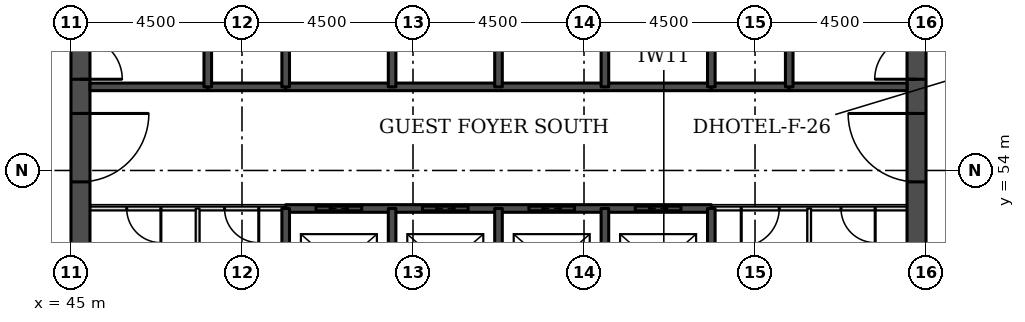
"""IFC4 building model, lengths in metres.
Left out: names, types, materials, properties, quantities, classifications, styles, units other than length and angle.
Written with IfcOpenShell. Run it as: python <this file> out.ifc"""

import sys

from ifc_helpers import new_model, si_unit, direction, frame, frame_2d, origin, place, context, subcontext, project, spatial, rectangle, extrude, element, fill, save


model = new_model("IFC4")
c1 = context("Model", 3, precision=1e-05, world=origin(), true_north=direction((0.0, 1.0)))
c2 = subcontext(c1, "Body", "Model", "MODEL_VIEW")
j1 = project(units=[si_unit("LENGTHUNIT", "METRE"), si_unit("PLANEANGLEUNIT", "RADIAN")], contexts=[c1])
p1 = place(None, origin())
s1 = spatial("IfcSite", under=j1, at=p1, CompositionType="ELEMENT")
p2 = place(p1, origin())
s2 = spatial("IfcBuilding", under=s1, at=p2, CompositionType="ELEMENT")
p3 = place(p2, frame((0.0, 0.0, 42.9)))
s3 = spatial("IfcBuildingStorey", under=s2, at=p3, CompositionType="ELEMENT", Elevation=42.9)
p4 = place(p3, frame((45.25, 49.5, 0.0), z_axis=(0.0, 0.0, 1.0), x_axis=(0.0, 1.0, 0.0)))
e1 = element("IfcWall", 1, at=p4, inside=s3, PredefinedType="SHEAR", context=c2, shape_type="SweptSolid", body=[
    extrude(rectangle(XDim=22.5, YDim=0.5, at=frame_2d((11.25, 0.0))), origin(), (0.0, 0.0, 1.0), 3.3),
])
p5 = place(p4, frame((4.2, 0.0, 0.0)))
e2 = element("IfcOpeningElement", 2, at=p5, cuts=e1, PredefinedType="OPENING", context=c2, shape_type="SweptSolid", body=[
    extrude(rectangle(XDim=1.8, YDim=2.1, at=frame_2d((0.9, 1.05))), frame((0.0, 0.26, 0.0), z_axis=(0.0, -1.0, 0.0), x_axis=(1.0, 0.0, 0.0)), (0.0, 0.0, 1.0), 0.52),
])
p6 = place(p4, frame((6.9, 0.0, 0.0)))
e3 = element("IfcOpeningElement", 3, at=p6, cuts=e1, PredefinedType="OPENING", context=c2, shape_type="SweptSolid", body=[
    extrude(rectangle(XDim=1.1, YDim=2.1, at=frame_2d((0.55, 1.05))), frame((0.0, 0.26, 0.0), z_axis=(0.0, -1.0, 0.0), x_axis=(1.0, 0.0, 0.0)), (0.0, 0.0, 1.0), 0.52),
])
p7 = place(p4, frame((13.6, 0.0, 0.0)))
e4 = element("IfcOpeningElement", 4, at=p7, cuts=e1, PredefinedType="OPENING", context=c2, shape_type="SweptSolid", body=[
    extrude(rectangle(XDim=1.1, YDim=2.1, at=frame_2d((0.55, 1.05))), frame((0.0, 0.26, 0.0), z_axis=(0.0, -1.0, 0.0), x_axis=(1.0, 0.0, 0.0)), (0.0, 0.0, 1.0), 0.52),
])
p8 = place(p4, frame((16.5, 0.0, 0.0)))
e5 = element("IfcOpeningElement", 5, at=p8, cuts=e1, PredefinedType="OPENING", context=c2, shape_type="SweptSolid", body=[
    extrude(rectangle(XDim=1.8, YDim=2.1, at=frame_2d((0.9, 1.05))), frame((0.0, 0.26, 0.0), z_axis=(0.0, -1.0, 0.0), x_axis=(1.0, 0.0, 0.0)), (0.0, 0.0, 1.0), 0.52),
])
p9 = place(p3, frame((67.25, 49.5, 0.0), z_axis=(0.0, 0.0, 1.0), x_axis=(0.0, 1.0, 0.0)))
e6 = element("IfcWall", 6, at=p9, inside=s3, PredefinedType="SHEAR", context=c2, shape_type="SweptSolid", body=[
    extrude(rectangle(XDim=22.5, YDim=0.5, at=frame_2d((11.25, 0.0))), origin(), (0.0, 0.0, 1.0), 3.3),
])
p10 = place(p9, frame((4.2, 0.0, 0.0)))
e7 = element("IfcOpeningElement", 7, at=p10, cuts=e6, PredefinedType="OPENING", context=c2, shape_type="SweptSolid", body=[
    extrude(rectangle(XDim=1.8, YDim=2.1, at=frame_2d((0.9, 1.05))), frame((0.0, 0.26, 0.0), z_axis=(0.0, -1.0, 0.0), x_axis=(1.0, 0.0, 0.0)), (0.0, 0.0, 1.0), 0.52),
])
p11 = place(p9, frame((6.9, 0.0, 0.0)))
e8 = element("IfcOpeningElement", 8, at=p11, cuts=e6, PredefinedType="OPENING", context=c2, shape_type="SweptSolid", body=[
    extrude(rectangle(XDim=1.1, YDim=2.1, at=frame_2d((0.55, 1.05))), frame((0.0, 0.26, 0.0), z_axis=(0.0, -1.0, 0.0), x_axis=(1.0, 0.0, 0.0)), (0.0, 0.0, 1.0), 0.52),
])
p12 = place(p9, frame((13.6, 0.0, 0.0)))
e9 = element("IfcOpeningElement", 9, at=p12, cuts=e6, PredefinedType="OPENING", context=c2, shape_type="SweptSolid", body=[
    extrude(rectangle(XDim=1.1, YDim=2.1, at=frame_2d((0.55, 1.05))), frame((0.0, 0.26, 0.0), z_axis=(0.0, -1.0, 0.0), x_axis=(1.0, 0.0, 0.0)), (0.0, 0.0, 1.0), 0.52),
])
p13 = place(p9, frame((16.5, 0.0, 0.0)))
e10 = element("IfcOpeningElement", 10, at=p13, cuts=e6, PredefinedType="OPENING", context=c2, shape_type="SweptSolid", body=[
    extrude(rectangle(XDim=1.8, YDim=2.1, at=frame_2d((0.9, 1.05))), frame((0.0, 0.26, 0.0), z_axis=(0.0, -1.0, 0.0), x_axis=(1.0, 0.0, 0.0)), (0.0, 0.0, 1.0), 0.52),
])
p14 = place(p3, frame((45.5, 53.0, 0.0), z_axis=(0.0, 0.0, 1.0), x_axis=(1.0, 0.0, 0.0)))
e11 = element("IfcWall", 11, at=p14, inside=s3, PredefinedType="PARTITIONING", context=c2, shape_type="SweptSolid", body=[
    extrude(rectangle(XDim=5.15, YDim=0.1, at=frame_2d((2.575, 0.0))), origin(), (0.0, 0.0, 1.0), 3.08),
])
p15 = place(p14, frame((0.966, 0.0, 0.0)))
e12 = element("IfcOpeningElement", 12, at=p15, cuts=e11, PredefinedType="OPENING", context=c2, shape_type="SweptSolid", body=[
    extrude(rectangle(XDim=0.9, YDim=2.1, at=frame_2d((0.45, 1.05))), frame((0.0, 0.06, 0.0), z_axis=(0.0, -1.0, 0.0), x_axis=(1.0, 0.0, 0.0)), (0.0, 0.0, 1.0), 0.12),
])
p16 = place(p14, frame((3.541, 0.0, 0.0)))
e13 = element("IfcOpeningElement", 13, at=p16, cuts=e11, PredefinedType="OPENING", context=c2, shape_type="SweptSolid", body=[
    extrude(rectangle(XDim=0.9, YDim=2.1, at=frame_2d((0.45, 1.05))), frame((0.0, 0.06, 0.0), z_axis=(0.0, -1.0, 0.0), x_axis=(1.0, 0.0, 0.0)), (0.0, 0.0, 1.0), 0.12),
])
p17 = place(p3, frame((61.85, 53.0, 0.0), z_axis=(0.0, 0.0, 1.0), x_axis=(1.0, 0.0, 0.0)))
e14 = element("IfcWall", 14, at=p17, inside=s3, PredefinedType="PARTITIONING", context=c2, shape_type="SweptSolid", body=[
    extrude(rectangle(XDim=5.15, YDim=0.1, at=frame_2d((2.575, 0.0))), origin(), (0.0, 0.0, 1.0), 3.08),
])
p18 = place(p17, frame((3.413, 0.0, 0.0)))
e15 = element("IfcOpeningElement", 15, at=p18, cuts=e14, PredefinedType="OPENING", context=c2, shape_type="SweptSolid", body=[
    extrude(rectangle(XDim=0.9, YDim=2.1, at=frame_2d((0.45, 1.05))), frame((0.0, 0.06, 0.0), z_axis=(0.0, -1.0, 0.0), x_axis=(1.0, 0.0, 0.0)), (0.0, 0.0, 1.0), 0.12),
])
p19 = place(p17, frame((0.788, 0.0, 0.0)))
e16 = element("IfcOpeningElement", 16, at=p19, cuts=e14, PredefinedType="OPENING", context=c2, shape_type="SweptSolid", body=[
    extrude(rectangle(XDim=1.0, YDim=2.1, at=frame_2d((0.5, 1.05))), frame((0.0, 0.06, 0.0), z_axis=(0.0, -1.0, 0.0), x_axis=(1.0, 0.0, 0.0)), (0.0, 0.0, 1.0), 0.12),
])
p20 = place(p3, frame((50.65, 53.0, 0.0), z_axis=(0.0, 0.0, 1.0), x_axis=(1.0, 0.0, 0.0)))
e17 = element("IfcWall", 17, at=p20, inside=s3, PredefinedType="SOLIDWALL", context=c2, shape_type="SweptSolid", body=[
    extrude(rectangle(XDim=11.2, YDim=0.2, at=frame_2d((5.6, 0.0))), origin(), (0.0, 0.0, 1.0), 3.08),
])
p21 = place(p20, frame((0.8, 0.0, 0.0)))
e18 = element("IfcOpeningElement", 18, at=p21, cuts=e17, PredefinedType="OPENING", context=c2, shape_type="SweptSolid", body=[
    extrude(rectangle(XDim=1.2, YDim=2.1, at=frame_2d((0.6, 1.05))), frame((0.0, 0.11, 0.0), z_axis=(0.0, -1.0, 0.0), x_axis=(1.0, 0.0, 0.0)), (0.0, 0.0, 1.0), 0.22),
])
p22 = place(p20, frame((3.6, 0.0, 0.0)))
e19 = element("IfcOpeningElement", 19, at=p22, cuts=e17, PredefinedType="OPENING", context=c2, shape_type="SweptSolid", body=[
    extrude(rectangle(XDim=1.2, YDim=2.1, at=frame_2d((0.6, 1.05))), frame((0.0, 0.11, 0.0), z_axis=(0.0, -1.0, 0.0), x_axis=(1.0, 0.0, 0.0)), (0.0, 0.0, 1.0), 0.22),
])
p23 = place(p20, frame((6.4, 0.0, 0.0)))
e20 = element("IfcOpeningElement", 20, at=p23, cuts=e17, PredefinedType="OPENING", context=c2, shape_type="SweptSolid", body=[
    extrude(rectangle(XDim=1.2, YDim=2.1, at=frame_2d((0.6, 1.05))), frame((0.0, 0.11, 0.0), z_axis=(0.0, -1.0, 0.0), x_axis=(1.0, 0.0, 0.0)), (0.0, 0.0, 1.0), 0.22),
])
p24 = place(p20, frame((9.2, 0.0, 0.0)))
e21 = element("IfcOpeningElement", 21, at=p24, cuts=e17, PredefinedType="OPENING", context=c2, shape_type="SweptSolid", body=[
    extrude(rectangle(XDim=1.2, YDim=2.1, at=frame_2d((0.6, 1.05))), frame((0.0, 0.11, 0.0), z_axis=(0.0, -1.0, 0.0), x_axis=(1.0, 0.0, 0.0)), (0.0, 0.0, 1.0), 0.22),
])
for number, where, z_axis, x_axis in (
    (22, (48.6, 56.2, 0.0), (0.0, 0.0, 1.0), (1.0, 0.0, 0.0)),
    (23, (61.85, 56.2, 0.0), (0.0, 0.0, 1.0), (1.0, 0.0, 0.0)),
):
    element("IfcWall", number, at=place(p3, frame(where, z_axis=z_axis, x_axis=x_axis)), inside=s3, PredefinedType="SOLIDWALL", context=c2, shape_type="SweptSolid", body=[
        extrude(rectangle(XDim=2.05, YDim=0.2, at=frame_2d((1.025, 0.0))), origin(), (0.0, 0.0, 1.0), 3.08),
    ])
p25 = place(p3, frame((45.5, 56.2, 0.0), z_axis=(0.0, 0.0, 1.0), x_axis=(1.0, 0.0, 0.0)))
e24 = element("IfcWall", 24, at=p25, inside=s3, PredefinedType="SOLIDWALL", context=c2, shape_type="SweptSolid", body=[
    extrude(rectangle(XDim=3.1, YDim=0.2, at=frame_2d((1.55, 0.0))), origin(), (0.0, 0.0, 1.0), 3.08),
])
p26 = place(p3, frame((50.65, 56.2, 0.0), z_axis=(0.0, 0.0, 1.0), x_axis=(1.0, 0.0, 0.0)))
e25 = element("IfcWall", 25, at=p26, inside=s3, PredefinedType="SOLIDWALL", context=c2, shape_type="SweptSolid", body=[
    extrude(rectangle(XDim=11.2, YDim=0.2, at=frame_2d((5.6, 0.0))), origin(), (0.0, 0.0, 1.0), 3.08),
])
p27 = place(p3, frame((63.9, 56.2, 0.0), z_axis=(0.0, 0.0, 1.0), x_axis=(1.0, 0.0, 0.0)))
e26 = element("IfcWall", 26, at=p27, inside=s3, PredefinedType="SOLIDWALL", context=c2, shape_type="SweptSolid", body=[
    extrude(rectangle(XDim=3.1, YDim=0.2, at=frame_2d((1.55, 0.0))), origin(), (0.0, 0.0, 1.0), 3.08),
])
p28 = place(p3, frame((48.333, 50.0, 0.0), z_axis=(0.0, 0.0, 1.0), x_axis=(0.0, 1.0, 0.0)))
e27 = element("IfcWall", 27, at=p28, inside=s3, PredefinedType="PARTITIONING", context=c2, shape_type="SweptSolid", body=[
    extrude(rectangle(XDim=3.0, YDim=0.1, at=frame_2d((1.5, 0.0))), origin(), (0.0, 0.0, 1.0), 3.08),
])
p29 = place(p3, frame((48.6, 56.2, 0.0), z_axis=(0.0, 0.0, 1.0), x_axis=(0.0, 1.0, 0.0)))
e28 = element("IfcWall", 28, at=p29, inside=s3, PredefinedType="SOLIDWALL", context=c2, shape_type="SweptSolid", body=[
    extrude(rectangle(XDim=5.8, YDim=0.2, at=frame_2d((2.9, 0.0))), origin(), (0.0, 0.0, 1.0), 3.08),
])
p30 = place(p3, frame((50.65, 50.0, 0.0), z_axis=(0.0, 0.0, 1.0), x_axis=(0.0, 1.0, 0.0)))
e29 = element("IfcWall", 29, at=p30, inside=s3, PredefinedType="SOLIDWALL", context=c2, shape_type="SweptSolid", body=[
    extrude(rectangle(XDim=3.0, YDim=0.2, at=frame_2d((1.5, 0.0))), origin(), (0.0, 0.0, 1.0), 3.08),
])
p31 = place(p3, frame((50.65, 56.2, 0.0), z_axis=(0.0, 0.0, 1.0), x_axis=(0.0, 1.0, 0.0)))
e30 = element("IfcWall", 30, at=p31, inside=s3, PredefinedType="SOLIDWALL", context=c2, shape_type="SweptSolid", body=[
    extrude(rectangle(XDim=2.8, YDim=0.2, at=frame_2d((1.4, 0.0))), origin(), (0.0, 0.0, 1.0), 3.08),
])
p32 = place(p3, frame((53.45, 50.0, 0.0), z_axis=(0.0, 0.0, 1.0), x_axis=(0.0, 1.0, 0.0)))
e31 = element("IfcWall", 31, at=p32, inside=s3, PredefinedType="SOLIDWALL", context=c2, shape_type="SweptSolid", body=[
    extrude(rectangle(XDim=3.0, YDim=0.2, at=frame_2d((1.5, 0.0))), origin(), (0.0, 0.0, 1.0), 3.08),
])
p33 = place(p3, frame((53.45, 56.2, 0.0), z_axis=(0.0, 0.0, 1.0), x_axis=(0.0, 1.0, 0.0)))
e32 = element("IfcWall", 32, at=p33, inside=s3, PredefinedType="SOLIDWALL", context=c2, shape_type="SweptSolid", body=[
    extrude(rectangle(XDim=2.8, YDim=0.2, at=frame_2d((1.4, 0.0))), origin(), (0.0, 0.0, 1.0), 3.08),
])
p34 = place(p3, frame((56.25, 50.0, 0.0), z_axis=(0.0, 0.0, 1.0), x_axis=(0.0, 1.0, 0.0)))
e33 = element("IfcWall", 33, at=p34, inside=s3, PredefinedType="SOLIDWALL", context=c2, shape_type="SweptSolid", body=[
    extrude(rectangle(XDim=3.0, YDim=0.2, at=frame_2d((1.5, 0.0))), origin(), (0.0, 0.0, 1.0), 3.08),
])
p35 = place(p3, frame((56.25, 56.2, 0.0), z_axis=(0.0, 0.0, 1.0), x_axis=(0.0, 1.0, 0.0)))
e34 = element("IfcWall", 34, at=p35, inside=s3, PredefinedType="SOLIDWALL", context=c2, shape_type="SweptSolid", body=[
    extrude(rectangle(XDim=2.8, YDim=0.2, at=frame_2d((1.4, 0.0))), origin(), (0.0, 0.0, 1.0), 3.08),
])
p36 = place(p3, frame((59.05, 50.0, 0.0), z_axis=(0.0, 0.0, 1.0), x_axis=(0.0, 1.0, 0.0)))
e35 = element("IfcWall", 35, at=p36, inside=s3, PredefinedType="SOLIDWALL", context=c2, shape_type="SweptSolid", body=[
    extrude(rectangle(XDim=3.0, YDim=0.2, at=frame_2d((1.5, 0.0))), origin(), (0.0, 0.0, 1.0), 3.08),
])
p37 = place(p3, frame((59.05, 56.2, 0.0), z_axis=(0.0, 0.0, 1.0), x_axis=(0.0, 1.0, 0.0)))
e36 = element("IfcWall", 36, at=p37, inside=s3, PredefinedType="SOLIDWALL", context=c2, shape_type="SweptSolid", body=[
    extrude(rectangle(XDim=2.8, YDim=0.2, at=frame_2d((1.4, 0.0))), origin(), (0.0, 0.0, 1.0), 3.08),
])
p38 = place(p3, frame((61.85, 50.0, 0.0), z_axis=(0.0, 0.0, 1.0), x_axis=(0.0, 1.0, 0.0)))
e37 = element("IfcWall", 37, at=p38, inside=s3, PredefinedType="SOLIDWALL", context=c2, shape_type="SweptSolid", body=[
    extrude(rectangle(XDim=3.0, YDim=0.2, at=frame_2d((1.5, 0.0))), origin(), (0.0, 0.0, 1.0), 3.08),
])
p39 = place(p3, frame((61.85, 56.2, 0.0), z_axis=(0.0, 0.0, 1.0), x_axis=(0.0, 1.0, 0.0)))
e38 = element("IfcWall", 38, at=p39, inside=s3, PredefinedType="SOLIDWALL", context=c2, shape_type="SweptSolid", body=[
    extrude(rectangle(XDim=2.8, YDim=0.2, at=frame_2d((1.4, 0.0))), origin(), (0.0, 0.0, 1.0), 3.08),
])
p40 = place(p3, frame((63.9, 56.2, 0.0), z_axis=(0.0, 0.0, 1.0), x_axis=(0.0, 1.0, 0.0)))
e39 = element("IfcWall", 39, at=p40, inside=s3, PredefinedType="SOLIDWALL", context=c2, shape_type="SweptSolid", body=[
    extrude(rectangle(XDim=5.8, YDim=0.2, at=frame_2d((2.9, 0.0))), origin(), (0.0, 0.0, 1.0), 3.08),
])
p41 = place(p3, frame((64.425, 50.0, 0.0), z_axis=(0.0, 0.0, 1.0), x_axis=(0.0, 1.0, 0.0)))
e40 = element("IfcWall", 40, at=p41, inside=s3, PredefinedType="PARTITIONING", context=c2, shape_type="SweptSolid", body=[
    extrude(rectangle(XDim=3.0, YDim=0.1, at=frame_2d((1.5, 0.0))), origin(), (0.0, 0.0, 1.0), 3.08),
])
p42 = place(p21, origin())
e41 = element("IfcDoor", 41, at=p42, inside=s3, OperationType="DOUBLE_DOOR_SLIDING", PredefinedType="DOOR", context=c2, shape_type="SweptSolid", body=[
    extrude(rectangle(XDim=1.2, YDim=2.1, at=frame_2d((0.6, 1.05))), frame((0.0, 0.025, 0.0), z_axis=(0.0, -1.0, 0.0), x_axis=(1.0, 0.0, 0.0)), (0.0, 0.0, 1.0), 0.05),
])
fill(e18, e41)
p43 = place(p22, origin())
e42 = element("IfcDoor", 42, at=p43, inside=s3, OperationType="DOUBLE_DOOR_SLIDING", PredefinedType="DOOR", context=c2, shape_type="SweptSolid", body=[
    extrude(rectangle(XDim=1.2, YDim=2.1, at=frame_2d((0.6, 1.05))), frame((0.0, 0.025, 0.0), z_axis=(0.0, -1.0, 0.0), x_axis=(1.0, 0.0, 0.0)), (0.0, 0.0, 1.0), 0.05),
])
fill(e19, e42)
p44 = place(p23, origin())
e43 = element("IfcDoor", 43, at=p44, inside=s3, OperationType="DOUBLE_DOOR_SLIDING", PredefinedType="DOOR", context=c2, shape_type="SweptSolid", body=[
    extrude(rectangle(XDim=1.2, YDim=2.1, at=frame_2d((0.6, 1.05))), frame((0.0, 0.025, 0.0), z_axis=(0.0, -1.0, 0.0), x_axis=(1.0, 0.0, 0.0)), (0.0, 0.0, 1.0), 0.05),
])
fill(e20, e43)
p45 = place(p24, origin())
e44 = element("IfcDoor", 44, at=p45, inside=s3, OperationType="DOUBLE_DOOR_SLIDING", PredefinedType="DOOR", context=c2, shape_type="SweptSolid", body=[
    extrude(rectangle(XDim=1.2, YDim=2.1, at=frame_2d((0.6, 1.05))), frame((0.0, 0.025, 0.0), z_axis=(0.0, -1.0, 0.0), x_axis=(1.0, 0.0, 0.0)), (0.0, 0.0, 1.0), 0.05),
])
fill(e21, e44)
p46 = place(p5, frame((1.8, 0.0, 0.0), z_axis=(0.0, 0.0, 1.0), x_axis=(-1.0, 0.0, 0.0)))
e45 = element("IfcDoor", 45, at=p46, inside=s3, OperationType="SINGLE_SWING_LEFT", PredefinedType="DOOR", context=c2, shape_type="SweptSolid", body=[
    extrude(rectangle(XDim=1.8, YDim=2.1, at=frame_2d((0.9, 1.05))), frame((0.0, 0.025, 0.0), z_axis=(0.0, -1.0, 0.0), x_axis=(1.0, 0.0, 0.0)), (0.0, 0.0, 1.0), 0.05),
])
fill(e2, e45)
p47 = place(p6, frame((1.1, 0.0, 0.0), z_axis=(0.0, 0.0, 1.0), x_axis=(-1.0, 0.0, 0.0)))
e46 = element("IfcDoor", 46, at=p47, inside=s3, OperationType="SINGLE_SWING_RIGHT", PredefinedType="DOOR", context=c2, shape_type="SweptSolid", body=[
    extrude(rectangle(XDim=1.1, YDim=2.1, at=frame_2d((0.55, 1.05))), frame((0.0, 0.025, 0.0), z_axis=(0.0, -1.0, 0.0), x_axis=(1.0, 0.0, 0.0)), (0.0, 0.0, 1.0), 0.05),
])
fill(e3, e46)
p48 = place(p10, origin())
e47 = element("IfcDoor", 47, at=p48, inside=s3, OperationType="SINGLE_SWING_RIGHT", PredefinedType="DOOR", context=c2, shape_type="SweptSolid", body=[
    extrude(rectangle(XDim=1.8, YDim=2.1, at=frame_2d((0.9, 1.05))), frame((0.0, 0.025, 0.0), z_axis=(0.0, -1.0, 0.0), x_axis=(1.0, 0.0, 0.0)), (0.0, 0.0, 1.0), 0.05),
])
fill(e7, e47)
p49 = place(p11, origin())
e48 = element("IfcDoor", 48, at=p49, inside=s3, OperationType="SINGLE_SWING_LEFT", PredefinedType="DOOR", context=c2, shape_type="SweptSolid", body=[
    extrude(rectangle(XDim=1.1, YDim=2.1, at=frame_2d((0.55, 1.05))), frame((0.0, 0.025, 0.0), z_axis=(0.0, -1.0, 0.0), x_axis=(1.0, 0.0, 0.0)), (0.0, 0.0, 1.0), 0.05),
])
fill(e8, e48)
p50 = place(p18, frame((0.9, 0.0, 0.0), z_axis=(0.0, 0.0, 1.0), x_axis=(-1.0, 0.0, 0.0)))
e49 = element("IfcDoor", 49, at=p50, inside=s3, OperationType="SINGLE_SWING_LEFT", PredefinedType="DOOR", context=c2, shape_type="SweptSolid", body=[
    extrude(rectangle(XDim=0.9, YDim=2.1, at=frame_2d((0.45, 1.05))), frame((0.0, 0.025, 0.0), z_axis=(0.0, -1.0, 0.0), x_axis=(1.0, 0.0, 0.0)), (0.0, 0.0, 1.0), 0.05),
])
fill(e15, e49)
p51 = place(p19, frame((1.0, 0.0, 0.0), z_axis=(0.0, 0.0, 1.0), x_axis=(-1.0, 0.0, 0.0)))
e50 = element("IfcDoor", 50, at=p51, inside=s3, OperationType="SINGLE_SWING_RIGHT", PredefinedType="DOOR", context=c2, shape_type="SweptSolid", body=[
    extrude(rectangle(XDim=1.0, YDim=2.1, at=frame_2d((0.5, 1.05))), frame((0.0, 0.025, 0.0), z_axis=(0.0, -1.0, 0.0), x_axis=(1.0, 0.0, 0.0)), (0.0, 0.0, 1.0), 0.05),
])
fill(e16, e50)
p52 = place(p15, frame((0.9, 0.0, 0.0), z_axis=(0.0, 0.0, 1.0), x_axis=(-1.0, 0.0, 0.0)))
e51 = element("IfcDoor", 51, at=p52, inside=s3, OperationType="SINGLE_SWING_LEFT", PredefinedType="DOOR", context=c2, shape_type="SweptSolid", body=[
    extrude(rectangle(XDim=0.9, YDim=2.1, at=frame_2d((0.45, 1.05))), frame((0.0, 0.025, 0.0), z_axis=(0.0, -1.0, 0.0), x_axis=(1.0, 0.0, 0.0)), (0.0, 0.0, 1.0), 0.05),
])
fill(e12, e51)
p53 = place(p16, frame((0.9, 0.0, 0.0), z_axis=(0.0, 0.0, 1.0), x_axis=(-1.0, 0.0, 0.0)))
e52 = element("IfcDoor", 52, at=p53, inside=s3, OperationType="SINGLE_SWING_LEFT", PredefinedType="DOOR", context=c2, shape_type="SweptSolid", body=[
    extrude(rectangle(XDim=0.9, YDim=2.1, at=frame_2d((0.45, 1.05))), frame((0.0, 0.025, 0.0), z_axis=(0.0, -1.0, 0.0), x_axis=(1.0, 0.0, 0.0)), (0.0, 0.0, 1.0), 0.05),
])
fill(e13, e52)
save(model, sys.argv[1])
